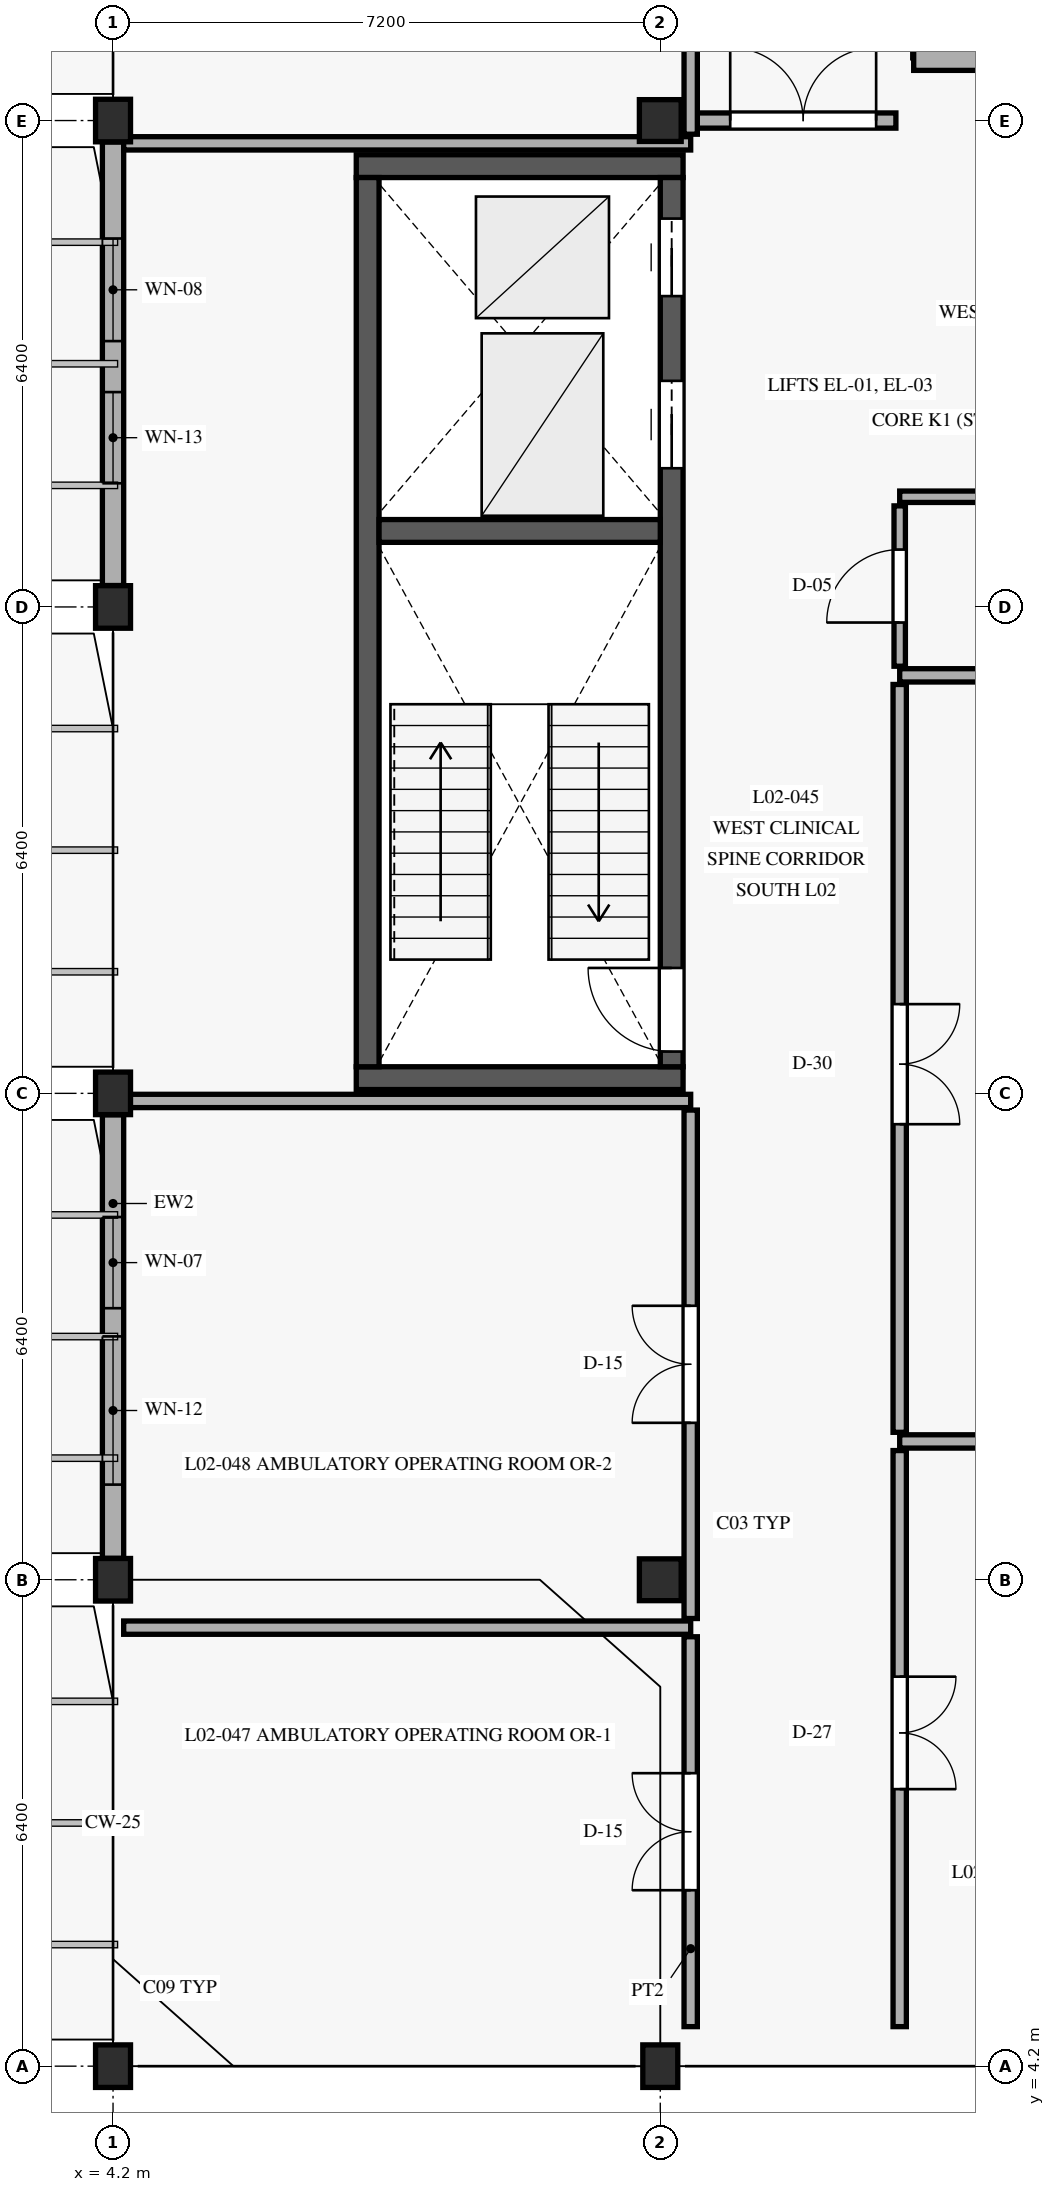
"""IFC4 building model, lengths in metres.
Left out: names, types, materials, properties, quantities, classifications, styles, units other than length and angle.
Written with IfcOpenShell. Run it as: python <this file> out.ifc"""

import sys

from ifc_helpers import new_model, si_unit, direction, frame, frame_2d, origin, origin_with_axes, origin_2d, place, context, subcontext, project, spatial, rectangle, extrude, element, fill, save


model = new_model("IFC4")
c1 = context("Model", 3, precision=1e-05, world=origin(), true_north=direction((0.0, 1.0)))
c2 = subcontext(c1, "Body", "Model", "MODEL_VIEW")
j1 = project(units=[si_unit("LENGTHUNIT", "METRE"), si_unit("PLANEANGLEUNIT", "RADIAN")], contexts=[c1])
p1 = place(None, origin())
s1 = spatial("IfcSite", under=j1, at=p1, CompositionType="ELEMENT")
p2 = place(p1, origin())
s2 = spatial("IfcBuilding", under=s1, at=p2, CompositionType="ELEMENT")
p3 = place(p2, frame((0.0, 0.0, 4.8)))
s3 = spatial("IfcBuildingStorey", under=s2, at=p3, CompositionType="ELEMENT", Elevation=4.8)
for number, where, z_axis, x_axis in (
    (1, (4.2, 4.2, 0.0), (0.0, 0.0, 1.0), (1.0, 0.0, 0.0)),
    (2, (4.2, 10.6, 0.0), (0.0, 0.0, 1.0), (1.0, 0.0, 0.0)),
    (3, (4.2, 17.0, 0.0), (0.0, 0.0, 1.0), (1.0, 0.0, 0.0)),
    (4, (4.2, 23.4, 0.0), (0.0, 0.0, 1.0), (1.0, 0.0, 0.0)),
    (5, (4.2, 29.8, 0.0), (0.0, 0.0, 1.0), (1.0, 0.0, 0.0)),
    (6, (11.4, 4.2, 0.0), (0.0, 0.0, 1.0), (1.0, 0.0, 0.0)),
):
    element("IfcColumn", number, at=place(p3, frame(where, z_axis=z_axis, x_axis=x_axis)), inside=s3, PredefinedType="COLUMN", context=c2, shape_type="SweptSolid", body=[
        extrude(rectangle(XDim=0.46, YDim=0.56, at=origin_2d()), origin(), (0.0, 0.0, 1.0), 4.5),
    ])
for number, where, z_axis, x_axis in (
    (7, (11.4, 10.6, 0.0), (0.0, 0.0, 1.0), (1.0, 0.0, 0.0)),
    (8, (11.4, 29.8, 0.0), (0.0, 0.0, 1.0), (1.0, 0.0, 0.0)),
):
    element("IfcColumn", number, at=place(p3, frame(where, z_axis=z_axis, x_axis=x_axis)), inside=s3, PredefinedType="COLUMN", context=c2, shape_type="SweptSolid", body=[
        extrude(rectangle(XDim=0.55, YDim=0.55, at=origin_2d()), origin(), (0.0, 0.0, 1.0), 4.5),
    ])
for number, where, z_axis, x_axis in (
    (9, (7.4, 17.2, 0.0), (0.0, 0.0, 1.0), (1.0, 0.0, 0.0)),
    (10, (11.7, 29.2, 0.0), (0.0, 0.0, 1.0), (-1.0, 0.0, 0.0)),
):
    element("IfcWall", number, at=place(p3, frame(where, z_axis=z_axis, x_axis=x_axis)), inside=s3, PredefinedType="SHEAR", context=c2, shape_type="SweptSolid", body=[
        extrude(rectangle(XDim=4.3, YDim=0.3, at=frame_2d((2.15, 0.0))), origin(), (0.0, 0.0, 1.0), 4.2),
    ])
p4 = place(p3, frame((7.55, 29.05, 0.0), z_axis=(0.0, 0.0, 1.0), x_axis=(0.0, -1.0, 0.0)))
e11 = element("IfcWall", 11, at=p4, inside=s3, PredefinedType="SHEAR", context=c2, shape_type="SweptSolid", body=[
    extrude(rectangle(XDim=11.7, YDim=0.3, at=frame_2d((5.85, 0.0))), origin(), (0.0, 0.0, 1.0), 4.2),
])
p5 = place(p3, frame((11.55, 17.35, 0.0), z_axis=(0.0, 0.0, 1.0), x_axis=(0.0, 1.0, 0.0)))
e12 = element("IfcWall", 12, at=p5, inside=s3, PredefinedType="SHEAR", context=c2, shape_type="SweptSolid", body=[
    extrude(rectangle(XDim=11.7, YDim=0.3, at=frame_2d((5.85, 0.0))), origin(), (0.0, 0.0, 1.0), 4.2),
])
p6 = place(p5, frame((0.2, 0.0, 0.0)))
e13 = element("IfcOpeningElement", 13, at=p6, cuts=e12, PredefinedType="OPENING", context=c2, shape_type="SweptSolid", body=[
    extrude(rectangle(XDim=1.1, YDim=2.2, at=frame_2d((0.55, 1.1))), frame((0.0, 0.16, 0.0), z_axis=(0.0, -1.0, 0.0), x_axis=(1.0, 0.0, 0.0)), (0.0, 0.0, 1.0), 0.32),
])
p7 = place(p5, frame((7.875, 0.0, 0.0)))
e14 = element("IfcOpeningElement", 14, at=p7, cuts=e12, PredefinedType="OPENING", context=c2, shape_type="SweptSolid", body=[
    extrude(rectangle(XDim=1.15, YDim=2.2, at=frame_2d((0.575, 1.1))), frame((0.0, 0.16, 0.0), z_axis=(0.0, -1.0, 0.0), x_axis=(1.0, 0.0, 0.0)), (0.0, 0.0, 1.0), 0.32),
])
p8 = place(p5, frame((10.14, 0.0, 0.0)))
e15 = element("IfcOpeningElement", 15, at=p8, cuts=e12, PredefinedType="OPENING", context=c2, shape_type="SweptSolid", body=[
    extrude(rectangle(XDim=1.02, YDim=2.15, at=frame_2d((0.51, 1.075))), frame((0.0, 0.16, 0.0), z_axis=(0.0, -1.0, 0.0), x_axis=(1.0, 0.0, 0.0)), (0.0, 0.0, 1.0), 0.32),
])
p9 = place(p3, frame((7.7, 24.4, 0.0), z_axis=(0.0, 0.0, 1.0), x_axis=(1.0, 0.0, 0.0)))
e16 = element("IfcWall", 16, at=p9, inside=s3, PredefinedType="SHEAR", context=c2, shape_type="SweptSolid", body=[
    extrude(rectangle(XDim=3.7, YDim=0.3, at=frame_2d((1.85, 0.0))), origin(), (0.0, 0.0, 1.0), 4.2),
])
p10 = place(p3, frame((4.2, 16.718, 0.0), z_axis=(0.0, 0.0, 1.0), x_axis=(0.0, -1.0, 0.0)))
e17 = element("IfcWall", 17, at=p10, inside=s3, PredefinedType="SOLIDWALL", context=c2, shape_type="SweptSolid", body=[
    extrude(rectangle(XDim=5.836, YDim=0.28, at=frame_2d((2.918, 0.0))), origin(), (0.0, 0.0, 1.0), 3.65),
])
p11 = place(p10, frame((1.345, 0.0, 0.88)))
e18 = element("IfcOpeningElement", 18, at=p11, cuts=e17, PredefinedType="OPENING", context=c2, shape_type="SweptSolid", body=[
    extrude(rectangle(XDim=1.2, YDim=1.85, at=frame_2d((0.6, 0.925))), frame((0.0, 0.15, 0.0), z_axis=(0.0, -1.0, 0.0), x_axis=(1.0, 0.0, 0.0)), (0.0, 0.0, 1.0), 0.3),
])
p12 = place(p10, frame((2.916, 0.0, 0.88)))
e19 = element("IfcOpeningElement", 19, at=p12, cuts=e17, PredefinedType="OPENING", context=c2, shape_type="SweptSolid", body=[
    extrude(rectangle(XDim=1.95, YDim=1.85, at=frame_2d((0.975, 0.925))), frame((0.0, 0.15, 0.0), z_axis=(0.0, -1.0, 0.0), x_axis=(1.0, 0.0, 0.0)), (0.0, 0.0, 1.0), 0.3),
])
p13 = place(p3, frame((4.2, 29.518, 0.0), z_axis=(0.0, 0.0, 1.0), x_axis=(0.0, -1.0, 0.0)))
e20 = element("IfcWall", 20, at=p13, inside=s3, PredefinedType="SOLIDWALL", context=c2, shape_type="SweptSolid", body=[
    extrude(rectangle(XDim=5.836, YDim=0.28, at=frame_2d((2.918, 0.0))), origin(), (0.0, 0.0, 1.0), 3.65),
])
p14 = place(p13, frame((1.27, 0.0, 0.88)))
e21 = element("IfcOpeningElement", 21, at=p14, cuts=e20, PredefinedType="OPENING", context=c2, shape_type="SweptSolid", body=[
    extrude(rectangle(XDim=1.35, YDim=1.85, at=frame_2d((0.675, 0.925))), frame((0.0, 0.15, 0.0), z_axis=(0.0, -1.0, 0.0), x_axis=(1.0, 0.0, 0.0)), (0.0, 0.0, 1.0), 0.3),
])
p15 = place(p13, frame((3.291, 0.0, 0.88)))
e22 = element("IfcOpeningElement", 22, at=p15, cuts=e20, PredefinedType="OPENING", context=c2, shape_type="SweptSolid", body=[
    extrude(rectangle(XDim=1.2, YDim=2.05, at=frame_2d((0.6, 1.025))), frame((0.0, 0.15, 0.0), z_axis=(0.0, -1.0, 0.0), x_axis=(1.0, 0.0, 0.0)), (0.0, 0.0, 1.0), 0.3),
])
p16 = place(p3, frame((18.866, 30.6, 0.0), z_axis=(0.0, 0.0, 1.0), x_axis=(-1.0, 0.0, 0.0)))
e23 = element("IfcWall", 23, at=p16, inside=s3, PredefinedType="SOLIDWALL", context=c2, shape_type="SweptSolid", body=[
    extrude(rectangle(XDim=4.132, YDim=0.28, at=frame_2d((2.066, 0.0))), origin(), (0.0, 0.0, 1.0), 4.2),
])
p17 = place(p16, frame((1.266, 0.0, 0.85)))
e24 = element("IfcOpeningElement", 24, at=p17, cuts=e23, PredefinedType="OPENING", context=c2, shape_type="SweptSolid", body=[
    extrude(rectangle(XDim=1.6, YDim=1.8, at=frame_2d((0.8, 0.9))), frame((0.0, 0.15, 0.0), z_axis=(0.0, -1.0, 0.0), x_axis=(1.0, 0.0, 0.0)), (0.0, 0.0, 1.0), 0.3),
])
p18 = place(p3, frame((11.85, 29.8, 0.0), z_axis=(0.0, 0.0, 1.0), x_axis=(1.0, 0.0, 0.0)))
e25 = element("IfcWall", 25, at=p18, inside=s3, PredefinedType="PARTITIONING", context=c2, shape_type="SweptSolid", body=[
    extrude(rectangle(XDim=2.65, YDim=0.2, at=frame_2d((1.325, 0.0))), origin(), (0.0, 0.0, 1.0), 3.795),
])
p19 = place(p18, frame((0.47, 0.0, 0.0)))
e26 = element("IfcOpeningElement", 26, at=p19, cuts=e25, PredefinedType="OPENING", context=c2, shape_type="SweptSolid", body=[
    extrude(rectangle(XDim=1.92, YDim=2.3, at=frame_2d((0.96, 1.15))), frame((0.0, 0.11, 0.0), z_axis=(0.0, -1.0, 0.0), x_axis=(1.0, 0.0, 0.0)), (0.0, 0.0, 1.0), 0.22),
])
p20 = place(p3, frame((11.8, 4.72, 0.0), z_axis=(0.0, 0.0, 1.0), x_axis=(0.0, 1.0, 0.0)))
e27 = element("IfcWall", 27, at=p20, inside=s3, PredefinedType="PARTITIONING", context=c2, shape_type="SweptSolid", body=[
    extrude(rectangle(XDim=5.13, YDim=0.175, at=frame_2d((2.565, 0.0))), origin(), (0.0, 0.0, 1.0), 4.195),
])
p21 = place(p20, frame((1.795, 0.0, 0.0)))
e28 = element("IfcOpeningElement", 28, at=p21, cuts=e27, PredefinedType="OPENING", context=c2, shape_type="SweptSolid", body=[
    extrude(rectangle(XDim=1.54, YDim=2.35, at=frame_2d((0.77, 1.175))), frame((0.0, 0.098, 0.0), z_axis=(0.0, -1.0, 0.0), x_axis=(1.0, 0.0, 0.0)), (0.0, 0.0, 1.0), 0.195),
])
p22 = place(p3, frame((4.34, 9.97, 0.0), z_axis=(0.0, 0.0, 1.0), x_axis=(1.0, 0.0, 0.0)))
e29 = element("IfcWall", 29, at=p22, inside=s3, PredefinedType="PARTITIONING", context=c2, shape_type="SweptSolid", body=[
    extrude(rectangle(XDim=7.46, YDim=0.175, at=frame_2d((3.73, 0.0))), origin(), (0.0, 0.0, 1.0), 3.645),
])
p23 = place(p3, frame((11.8, 10.09, 0.0), z_axis=(0.0, 0.0, 1.0), x_axis=(0.0, 1.0, 0.0)))
e30 = element("IfcWall", 30, at=p23, inside=s3, PredefinedType="PARTITIONING", context=c2, shape_type="SweptSolid", body=[
    extrude(rectangle(XDim=6.69, YDim=0.175, at=frame_2d((3.345, 0.0))), origin(), (0.0, 0.0, 1.0), 3.795),
])
p24 = place(p23, frame((2.575, 0.0, 0.0)))
e31 = element("IfcOpeningElement", 31, at=p24, cuts=e30, PredefinedType="OPENING", context=c2, shape_type="SweptSolid", body=[
    extrude(rectangle(XDim=1.54, YDim=2.35, at=frame_2d((0.77, 1.175))), frame((0.0, 0.098, 0.0), z_axis=(0.0, -1.0, 0.0), x_axis=(1.0, 0.0, 0.0)), (0.0, 0.0, 1.0), 0.195),
])
p25 = place(p3, frame((4.34, 16.9, 0.0), z_axis=(0.0, 0.0, 1.0), x_axis=(1.0, 0.0, 0.0)))
e32 = element("IfcWall", 32, at=p25, inside=s3, PredefinedType="PARTITIONING", context=c2, shape_type="SweptSolid", body=[
    extrude(rectangle(XDim=7.46, YDim=0.175, at=frame_2d((3.73, 0.0))), origin(), (0.0, 0.0, 1.0), 3.795),
])
p26 = place(p3, frame((11.8, 29.62, 0.0), z_axis=(0.0, 0.0, 1.0), x_axis=(0.0, 1.0, 0.0)))
e33 = element("IfcWall", 33, at=p26, inside=s3, PredefinedType="PARTITIONING", context=c2, shape_type="SweptSolid", body=[
    extrude(rectangle(XDim=10.89, YDim=0.175, at=frame_2d((5.445, 0.0))), origin(), (0.0, 0.0, 1.0), 3.795),
])
p27 = place(p26, frame((4.164, 0.0, 0.0)))
e34 = element("IfcOpeningElement", 34, at=p27, cuts=e33, PredefinedType="OPENING", context=c2, shape_type="SweptSolid", body=[
    extrude(rectangle(XDim=1.36, YDim=2.3, at=frame_2d((0.68, 1.15))), frame((0.0, 0.098, 0.0), z_axis=(0.0, -1.0, 0.0), x_axis=(1.0, 0.0, 0.0)), (0.0, 0.0, 1.0), 0.195),
])
p28 = place(p3, frame((4.34, 29.5, 0.0), z_axis=(0.0, 0.0, 1.0), x_axis=(1.0, 0.0, 0.0)))
e35 = element("IfcWall", 35, at=p28, inside=s3, PredefinedType="PARTITIONING", context=c2, shape_type="SweptSolid", body=[
    extrude(rectangle(XDim=7.46, YDim=0.175, at=frame_2d((3.73, 0.0))), origin(), (0.0, 0.0, 1.0), 3.645),
])
p29 = place(p3, frame((14.55, 4.72, 0.0), z_axis=(0.0, 0.0, 1.0), x_axis=(0.0, 1.0, 0.0)))
e36 = element("IfcWall", 36, at=p29, inside=s3, PredefinedType="PARTITIONING", context=c2, shape_type="SweptSolid", body=[
    extrude(rectangle(XDim=7.58, YDim=0.175, at=frame_2d((3.79, 0.0))), origin(), (0.0, 0.0, 1.0), 3.795),
])
p30 = place(p29, frame((3.125, 0.0, 0.0)))
e37 = element("IfcOpeningElement", 37, at=p30, cuts=e36, PredefinedType="OPENING", context=c2, shape_type="SweptSolid", body=[
    extrude(rectangle(XDim=1.48, YDim=2.28, at=frame_2d((0.74, 1.14))), frame((0.0, 0.098, 0.0), z_axis=(0.0, -1.0, 0.0), x_axis=(1.0, 0.0, 0.0)), (0.0, 0.0, 1.0), 0.195),
])
p31 = place(p3, frame((14.55, 12.42, 0.0), z_axis=(0.0, 0.0, 1.0), x_axis=(1.0, 0.0, 0.0)))
e38 = element("IfcWall", 38, at=p31, inside=s3, PredefinedType="PARTITIONING", context=c2, shape_type="SweptSolid", body=[
    extrude(rectangle(XDim=7.51, YDim=0.175, at=frame_2d((3.755, 0.0))), origin(), (0.0, 0.0, 1.0), 3.785),
])
p32 = place(p3, frame((14.55, 12.54, 0.0), z_axis=(0.0, 0.0, 1.0), x_axis=(0.0, 1.0, 0.0)))
e39 = element("IfcWall", 39, at=p32, inside=s3, PredefinedType="PARTITIONING", context=c2, shape_type="SweptSolid", body=[
    extrude(rectangle(XDim=9.84, YDim=0.175, at=frame_2d((4.92, 0.0))), origin(), (0.0, 0.0, 1.0), 3.795),
])
p33 = place(p32, frame((4.054, 0.0, 0.0)))
e40 = element("IfcOpeningElement", 40, at=p33, cuts=e39, PredefinedType="OPENING", context=c2, shape_type="SweptSolid", body=[
    extrude(rectangle(XDim=1.58, YDim=2.26, at=frame_2d((0.79, 1.13))), frame((0.0, 0.098, 0.0), z_axis=(0.0, -1.0, 0.0), x_axis=(1.0, 0.0, 0.0)), (0.0, 0.0, 1.0), 0.195),
])
p34 = place(p3, frame((14.55, 22.5, 0.0), z_axis=(0.0, 0.0, 1.0), x_axis=(1.0, 0.0, 0.0)))
e41 = element("IfcWall", 41, at=p34, inside=s3, PredefinedType="PARTITIONING", context=c2, shape_type="SweptSolid", body=[
    extrude(rectangle(XDim=7.51, YDim=0.175, at=frame_2d((3.755, 0.0))), origin(), (0.0, 0.0, 1.0), 3.785),
])
p35 = place(p3, frame((14.55, 22.62, 0.0), z_axis=(0.0, 0.0, 1.0), x_axis=(0.0, 1.0, 0.0)))
e42 = element("IfcWall", 42, at=p35, inside=s3, PredefinedType="PARTITIONING", context=c2, shape_type="SweptSolid", body=[
    extrude(rectangle(XDim=2.11, YDim=0.15, at=frame_2d((1.055, 0.0))), origin(), (0.0, 0.0, 1.0), 3.795),
])
p36 = place(p35, frame((0.575, 0.0, 0.0)))
e43 = element("IfcOpeningElement", 43, at=p36, cuts=e42, PredefinedType="OPENING", context=c2, shape_type="SweptSolid", body=[
    extrude(rectangle(XDim=0.96, YDim=2.1, at=frame_2d((0.48, 1.05))), frame((0.0, 0.085, 0.0), z_axis=(0.0, -1.0, 0.0), x_axis=(1.0, 0.0, 0.0)), (0.0, 0.0, 1.0), 0.17),
])
p37 = place(p3, frame((14.55, 24.85, 0.0), z_axis=(0.0, 0.0, 1.0), x_axis=(1.0, 0.0, 0.0)))
e44 = element("IfcWall", 44, at=p37, inside=s3, PredefinedType="PARTITIONING", context=c2, shape_type="SweptSolid", body=[
    extrude(rectangle(XDim=7.51, YDim=0.15, at=frame_2d((3.755, 0.0))), origin(), (0.0, 0.0, 1.0), 3.785),
])
p38 = place(p6, origin_with_axes())
e45 = element("IfcDoor", 45, at=p38, inside=s3, OperationType="SINGLE_SWING_RIGHT", PredefinedType="DOOR", context=c2, shape_type="SweptSolid", body=[
    extrude(rectangle(XDim=1.1, YDim=2.2, at=frame_2d((0.55, 1.1))), frame((0.0, 0.025, 0.0), z_axis=(0.0, -1.0, 0.0), x_axis=(1.0, 0.0, 0.0)), (0.0, 0.0, 1.0), 0.05),
])
fill(e13, e45)
p39 = place(p7, origin_with_axes())
e46 = element("IfcDoor", 46, at=p39, inside=s3, OperationType="SLIDING_TO_LEFT", PredefinedType="DOOR", context=c2, shape_type="SweptSolid", body=[
    extrude(rectangle(XDim=1.15, YDim=2.2, at=frame_2d((0.575, 1.1))), frame((0.0, 0.025, 0.0), z_axis=(0.0, -1.0, 0.0), x_axis=(1.0, 0.0, 0.0)), (0.0, 0.0, 1.0), 0.05),
])
fill(e14, e46)
p40 = place(p8, origin_with_axes())
e47 = element("IfcDoor", 47, at=p40, inside=s3, OperationType="SLIDING_TO_LEFT", PredefinedType="DOOR", context=c2, shape_type="SweptSolid", body=[
    extrude(rectangle(XDim=1.02, YDim=2.15, at=frame_2d((0.51, 1.075))), frame((0.0, 0.025, 0.0), z_axis=(0.0, -1.0, 0.0), x_axis=(1.0, 0.0, 0.0)), (0.0, 0.0, 1.0), 0.05),
])
fill(e15, e47)
p41 = place(p11, origin_with_axes())
e48 = element("IfcWindow", 48, at=p41, inside=s3, PartitioningType="SINGLE_PANEL", PredefinedType="WINDOW", context=c2, shape_type="SweptSolid", body=[
    extrude(rectangle(XDim=1.2, YDim=1.85, at=frame_2d((0.6, 0.925))), frame((0.0, 0.03, 0.0), z_axis=(0.0, -1.0, 0.0), x_axis=(1.0, 0.0, 0.0)), (0.0, 0.0, 1.0), 0.06),
])
fill(e18, e48)
p42 = place(p12, origin_with_axes())
e49 = element("IfcWindow", 49, at=p42, inside=s3, PartitioningType="SINGLE_PANEL", PredefinedType="WINDOW", context=c2, shape_type="SweptSolid", body=[
    extrude(rectangle(XDim=1.95, YDim=1.85, at=frame_2d((0.975, 0.925))), frame((0.0, 0.03, 0.0), z_axis=(0.0, -1.0, 0.0), x_axis=(1.0, 0.0, 0.0)), (0.0, 0.0, 1.0), 0.06),
])
fill(e19, e49)
p43 = place(p14, origin_with_axes())
e50 = element("IfcWindow", 50, at=p43, inside=s3, PartitioningType="SINGLE_PANEL", PredefinedType="WINDOW", context=c2, shape_type="SweptSolid", body=[
    extrude(rectangle(XDim=1.35, YDim=1.85, at=frame_2d((0.675, 0.925))), frame((0.0, 0.03, 0.0), z_axis=(0.0, -1.0, 0.0), x_axis=(1.0, 0.0, 0.0)), (0.0, 0.0, 1.0), 0.06),
])
fill(e21, e50)
p44 = place(p15, origin_with_axes())
e51 = element("IfcWindow", 51, at=p44, inside=s3, PartitioningType="SINGLE_PANEL", PredefinedType="WINDOW", context=c2, shape_type="SweptSolid", body=[
    extrude(rectangle(XDim=1.2, YDim=2.05, at=frame_2d((0.6, 1.025))), frame((0.0, 0.03, 0.0), z_axis=(0.0, -1.0, 0.0), x_axis=(1.0, 0.0, 0.0)), (0.0, 0.0, 1.0), 0.06),
])
fill(e22, e51)
p45 = place(p19, origin_with_axes())
e52 = element("IfcDoor", 52, at=p45, inside=s3, OperationType="DOUBLE_DOOR_DOUBLE_SWING", PredefinedType="DOOR", context=c2, shape_type="SweptSolid", body=[
    extrude(rectangle(XDim=1.92, YDim=2.3, at=frame_2d((0.96, 1.15))), frame((0.0, 0.025, 0.0), z_axis=(0.0, -1.0, 0.0), x_axis=(1.0, 0.0, 0.0)), (0.0, 0.0, 1.0), 0.05),
])
fill(e26, e52)
p46 = place(p21, origin_with_axes())
e53 = element("IfcDoor", 53, at=p46, inside=s3, OperationType="DOUBLE_DOOR_SINGLE_SWING", PredefinedType="DOOR", context=c2, shape_type="SweptSolid", body=[
    extrude(rectangle(XDim=1.54, YDim=2.35, at=frame_2d((0.77, 1.175))), frame((0.0, 0.025, 0.0), z_axis=(0.0, -1.0, 0.0), x_axis=(1.0, 0.0, 0.0)), (0.0, 0.0, 1.0), 0.05),
])
fill(e28, e53)
p47 = place(p24, origin_with_axes())
e54 = element("IfcDoor", 54, at=p47, inside=s3, OperationType="DOUBLE_DOOR_SINGLE_SWING", PredefinedType="DOOR", context=c2, shape_type="SweptSolid", body=[
    extrude(rectangle(XDim=1.54, YDim=2.35, at=frame_2d((0.77, 1.175))), frame((0.0, 0.025, 0.0), z_axis=(0.0, -1.0, 0.0), x_axis=(1.0, 0.0, 0.0)), (0.0, 0.0, 1.0), 0.05),
])
fill(e31, e54)
p48 = place(p30, frame((1.48, 0.0, 0.0), z_axis=(0.0, 0.0, 1.0), x_axis=(-1.0, 0.0, 0.0)))
e55 = element("IfcDoor", 55, at=p48, inside=s3, OperationType="DOUBLE_DOOR_SINGLE_SWING", PredefinedType="DOOR", context=c2, shape_type="SweptSolid", body=[
    extrude(rectangle(XDim=1.48, YDim=2.28, at=frame_2d((0.74, 1.14))), frame((0.0, 0.025, 0.0), z_axis=(0.0, -1.0, 0.0), x_axis=(1.0, 0.0, 0.0)), (0.0, 0.0, 1.0), 0.05),
])
fill(e37, e55)
p49 = place(p33, frame((1.58, 0.0, 0.0), z_axis=(0.0, 0.0, 1.0), x_axis=(-1.0, 0.0, 0.0)))
e56 = element("IfcDoor", 56, at=p49, inside=s3, OperationType="DOUBLE_DOOR_SINGLE_SWING", PredefinedType="DOOR", context=c2, shape_type="SweptSolid", body=[
    extrude(rectangle(XDim=1.58, YDim=2.26, at=frame_2d((0.79, 1.13))), frame((0.0, 0.025, 0.0), z_axis=(0.0, -1.0, 0.0), x_axis=(1.0, 0.0, 0.0)), (0.0, 0.0, 1.0), 0.05),
])
fill(e40, e56)
p50 = place(p36, frame((0.96, 0.0, 0.0), z_axis=(0.0, 0.0, 1.0), x_axis=(-1.0, 0.0, 0.0)))
e57 = element("IfcDoor", 57, at=p50, inside=s3, OperationType="SINGLE_SWING_RIGHT", PredefinedType="DOOR", context=c2, shape_type="SweptSolid", body=[
    extrude(rectangle(XDim=0.96, YDim=2.1, at=frame_2d((0.48, 1.05))), frame((0.0, 0.025, 0.0), z_axis=(0.0, -1.0, 0.0), x_axis=(1.0, 0.0, 0.0)), (0.0, 0.0, 1.0), 0.05),
])
fill(e43, e57)
save(model, sys.argv[1])
